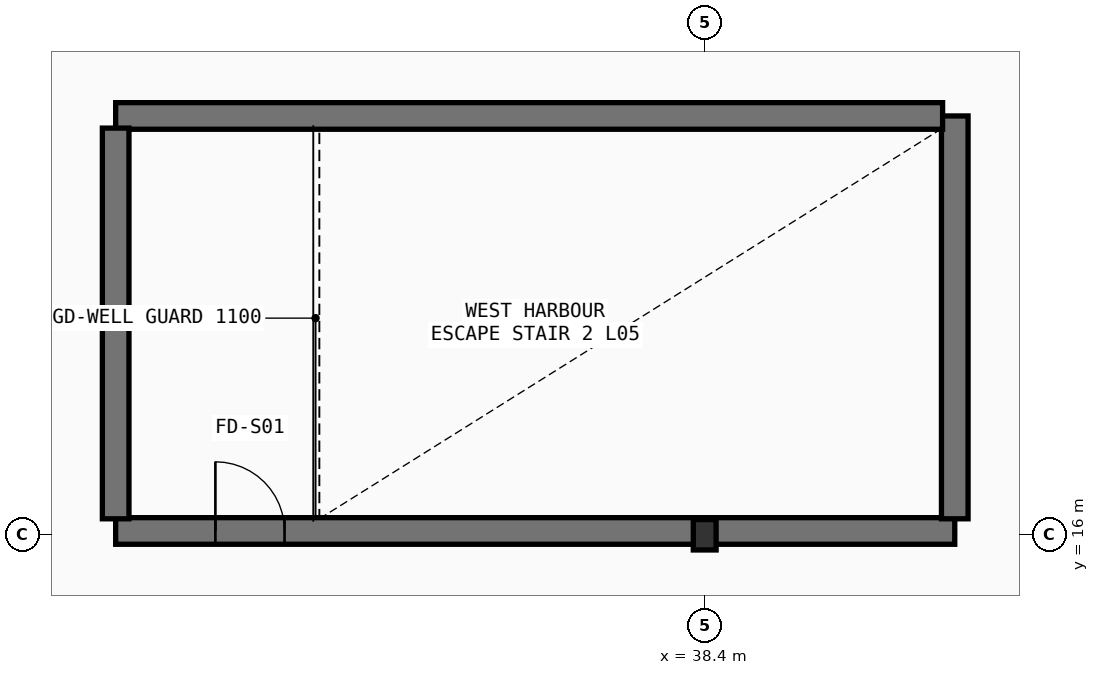
"""IFC4 building model, lengths in metres.
Left out: names, types, materials, properties, quantities, classifications, styles, units other than length and angle.
Written with IfcOpenShell. Run it as: python <this file> out.ifc"""

import sys

from ifc_helpers import new_model, si_unit, direction, frame, frame_2d, origin, origin_2d, place, context, subcontext, project, spatial, rectangle, i_section, extrude, element, fill, save


model = new_model("IFC4")
c1 = context("Model", 3, precision=1e-05, world=origin(), true_north=direction((0.0, 1.0)))
c2 = subcontext(c1, "Body", "Model", "MODEL_VIEW")
j1 = project(units=[si_unit("LENGTHUNIT", "METRE"), si_unit("PLANEANGLEUNIT", "RADIAN")], contexts=[c1])
p1 = place(None, origin())
s1 = spatial("IfcSite", under=j1, at=p1, CompositionType="ELEMENT")
p2 = place(p1, origin())
s2 = spatial("IfcBuilding", under=s1, at=p2, CompositionType="ELEMENT")
p3 = place(p2, frame((0.0, 0.0, 24.9)))
s3 = spatial("IfcBuildingStorey", under=s2, at=p3, CompositionType="ELEMENT", Elevation=24.9)
p4 = place(p3, frame((38.4, 16.0, 0.0), z_axis=(0.0, 0.0, 1.0), x_axis=(1.0, 0.0, 0.0)))
e1 = element("IfcColumn", 1, at=p4, inside=s3, PredefinedType="COLUMN", context=c2, shape_type="SweptSolid", body=[
    extrude(i_section(OverallWidth=0.3, OverallDepth=0.4, WebThickness=0.013, FlangeThickness=0.024, FilletRadius=0.027, at=origin_2d()), origin(), (0.0, 0.0, 1.0), 4.5),
])
p5 = place(p3, frame((30.65, 16.05, 0.0), z_axis=(0.0, 0.0, 1.0), x_axis=(1.0, 0.0, 0.0)))
e2 = element("IfcWall", 2, at=p5, inside=s3, PredefinedType="SHEAR", context=c2, shape_type="SweptSolid", body=[
    extrude(rectangle(XDim=11.04, YDim=0.35, at=frame_2d((5.52, 0.0))), origin(), (0.0, 0.0, 1.0), 4.27),
])
p6 = place(p5, frame((1.312, 0.0, 0.0)))
e3 = element("IfcOpeningElement", 3, at=p6, cuts=e2, PredefinedType="OPENING", context=c2, shape_type="SweptSolid", body=[
    extrude(rectangle(XDim=0.91, YDim=2.08, at=frame_2d((0.455, 1.04))), frame((0.0, 0.185, 0.0), z_axis=(0.0, -1.0, 0.0), x_axis=(1.0, 0.0, 0.0)), (0.0, 0.0, 1.0), 0.37),
])
p7 = place(p3, frame((41.69, 16.21, 0.0), z_axis=(0.0, 0.0, 1.0), x_axis=(0.0, 1.0, 0.0)))
e4 = element("IfcWall", 4, at=p7, inside=s3, PredefinedType="SHEAR", context=c2, shape_type="SweptSolid", body=[
    extrude(rectangle(XDim=5.3, YDim=0.35, at=frame_2d((2.65, 0.0))), origin(), (0.0, 0.0, 1.0), 4.27),
])
p8 = place(p3, frame((41.53, 21.51, 0.0), z_axis=(0.0, 0.0, 1.0), x_axis=(-1.0, 0.0, 0.0)))
e5 = element("IfcWall", 5, at=p8, inside=s3, PredefinedType="SHEAR", context=c2, shape_type="SweptSolid", body=[
    extrude(rectangle(XDim=10.88, YDim=0.35, at=frame_2d((5.44, 0.0))), origin(), (0.0, 0.0, 1.0), 4.27),
])
p9 = place(p3, frame((30.65, 21.35, 0.0), z_axis=(0.0, 0.0, 1.0), x_axis=(0.0, -1.0, 0.0)))
e6 = element("IfcWall", 6, at=p9, inside=s3, PredefinedType="SHEAR", context=c2, shape_type="SweptSolid", body=[
    extrude(rectangle(XDim=5.14, YDim=0.35, at=frame_2d((2.57, 0.0))), origin(), (0.0, 0.0, 1.0), 4.27),
])
p10 = place(p6, origin())
e7 = element("IfcDoor", 7, at=p10, inside=s3, OperationType="SINGLE_SWING_RIGHT", PredefinedType="DOOR", context=c2, shape_type="SweptSolid", body=[
    extrude(rectangle(XDim=0.91, YDim=2.08, at=frame_2d((0.455, 1.04))), frame((0.0, 0.025, 0.0), z_axis=(0.0, -1.0, 0.0), x_axis=(1.0, 0.0, 0.0)), (0.0, 0.0, 1.0), 0.05),
])
fill(e3, e7)
save(model, sys.argv[1])
